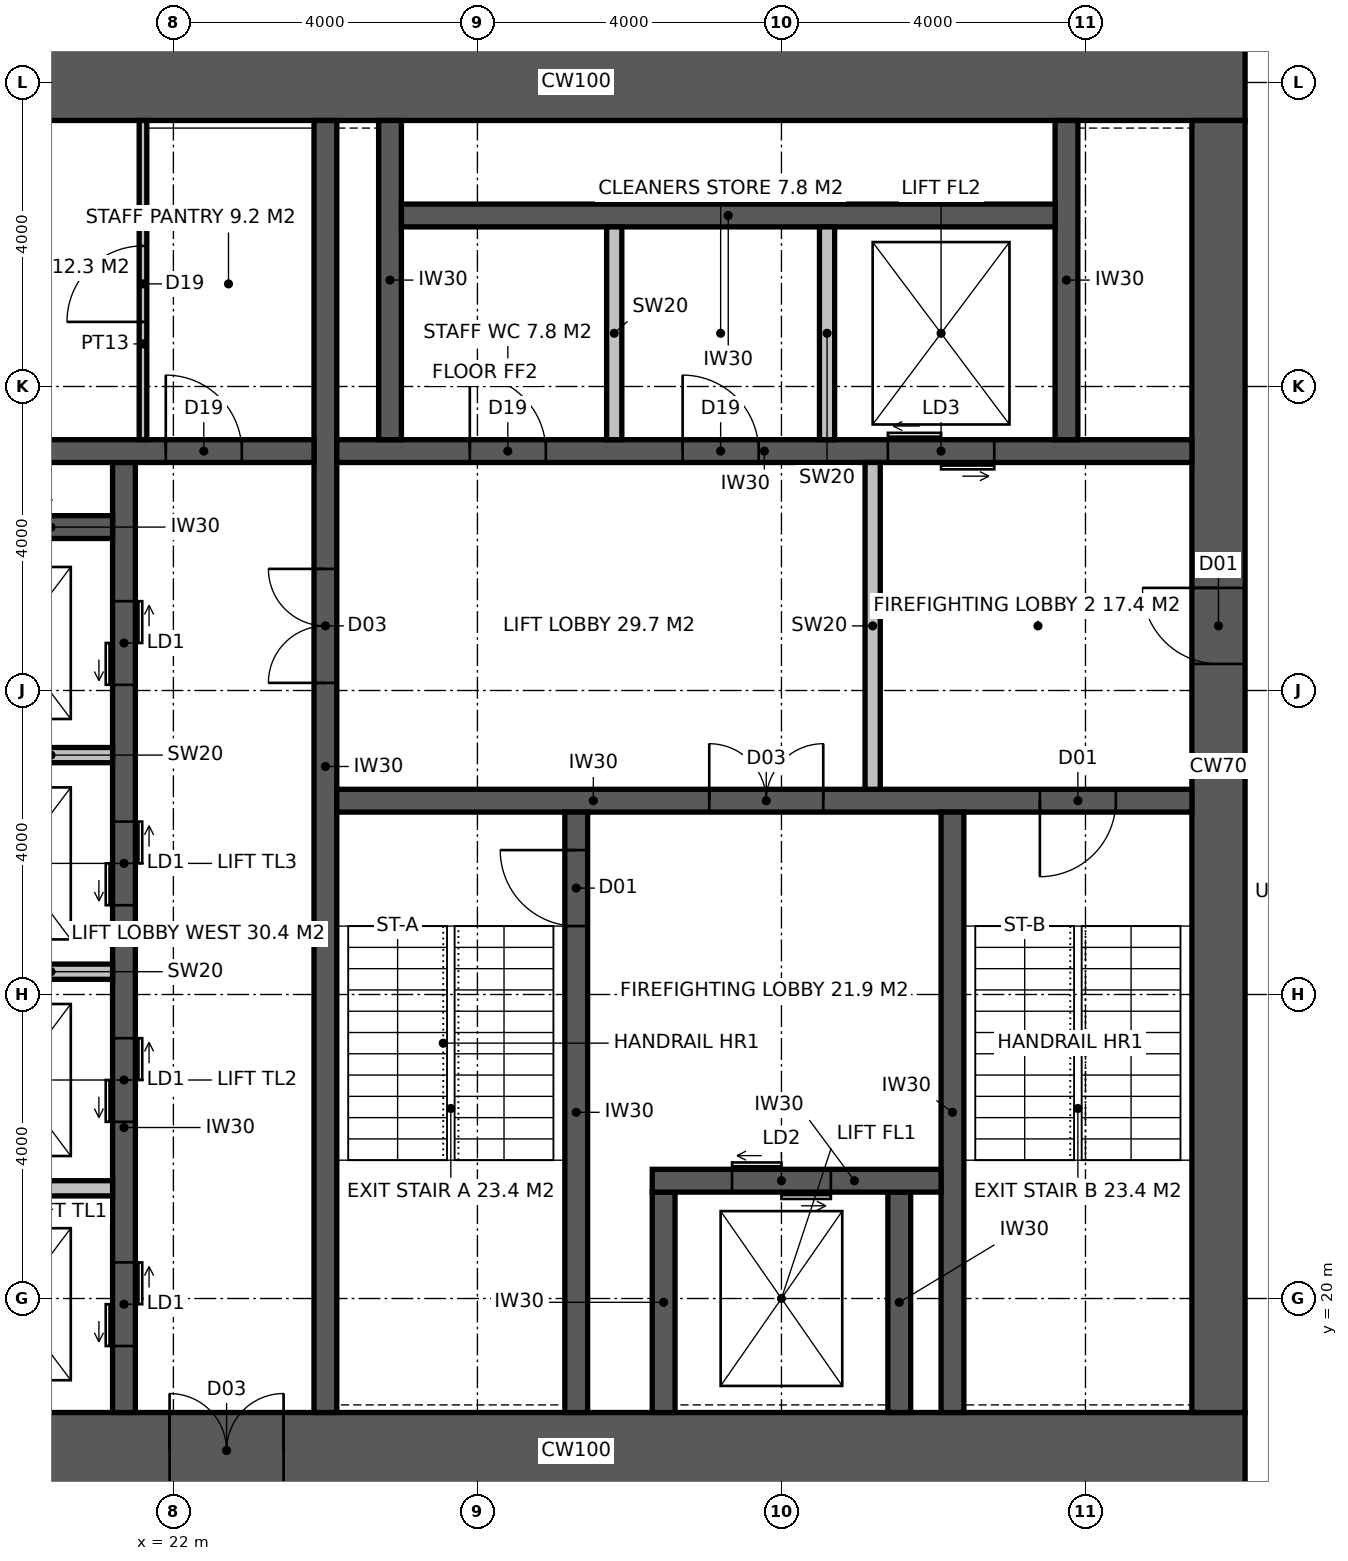
"""IFC4 building model, lengths in metres.
Left out: names, types, materials, properties, quantities, classifications, styles, units other than length and angle.
Written with IfcOpenShell. Run it as: python <this file> out.ifc"""

import sys

from ifc_helpers import new_model, si_unit, direction, frame, frame_2d, origin, place, context, subcontext, project, spatial, rectangle, extrude, element, fill, save


model = new_model("IFC4")
c1 = context("Model", 3, precision=1e-05, world=origin(), true_north=direction((0.0, 1.0)))
c2 = subcontext(c1, "Body", "Model", "MODEL_VIEW")
j1 = project(units=[si_unit("LENGTHUNIT", "METRE"), si_unit("PLANEANGLEUNIT", "RADIAN")], contexts=[c1])
p1 = place(None, origin())
s1 = spatial("IfcSite", under=j1, at=p1, CompositionType="ELEMENT")
p2 = place(p1, origin())
s2 = spatial("IfcBuilding", under=s1, at=p2, CompositionType="ELEMENT")
p3 = place(p2, frame((0.0, 0.0, 242.2)))
s3 = spatial("IfcBuildingStorey", under=s2, at=p3, CompositionType="ELEMENT", Elevation=242.2)
p4 = place(p3, frame((18.5, 18.0, -0.15), z_axis=(0.0, 0.0, 1.0), x_axis=(1.0, 0.0, 0.0)))
e1 = element("IfcWall", 1, at=p4, inside=s3, PredefinedType="SHEAR", context=c2, shape_type="SweptSolid", body=[
    extrude(rectangle(XDim=17.6, YDim=1.0, at=frame_2d((8.8, 0.0))), origin(), (0.0, 0.0, 1.0), 4.0),
])
p5 = place(p4, frame((3.45, 0.0, 0.15)))
e2 = element("IfcOpeningElement", 2, at=p5, cuts=e1, PredefinedType="OPENING", context=c2, shape_type="SweptSolid", body=[
    extrude(rectangle(XDim=1.5, YDim=2.4, at=frame_2d((0.75, 1.2))), frame((0.0, 0.51, 0.0), z_axis=(0.0, -1.0, 0.0), x_axis=(1.0, 0.0, 0.0)), (0.0, 0.0, 1.0), 1.02),
])
p6 = place(p3, frame((18.5, 36.0, -0.15), z_axis=(0.0, 0.0, 1.0), x_axis=(1.0, 0.0, 0.0)))
e3 = element("IfcWall", 3, at=p6, inside=s3, PredefinedType="SHEAR", context=c2, shape_type="SweptSolid", body=[
    extrude(rectangle(XDim=17.6, YDim=1.0, at=frame_2d((8.8, 0.0))), origin(), (0.0, 0.0, 1.0), 4.0),
])
p7 = place(p3, frame((35.75, 18.5, -0.15), z_axis=(0.0, 0.0, 1.0), x_axis=(0.0, 1.0, 0.0)))
e4 = element("IfcWall", 4, at=p7, inside=s3, PredefinedType="SHEAR", context=c2, shape_type="SweptSolid", body=[
    extrude(rectangle(XDim=17.0, YDim=0.7, at=frame_2d((8.5, 0.0))), origin(), (0.0, 0.0, 1.0), 4.0),
])
p8 = place(p7, frame((9.85, 0.0, 0.15)))
e5 = element("IfcOpeningElement", 5, at=p8, cuts=e4, PredefinedType="OPENING", context=c2, shape_type="SweptSolid", body=[
    extrude(rectangle(XDim=1.0, YDim=2.2, at=frame_2d((0.5, 1.1))), frame((0.0, 0.36, 0.0), z_axis=(0.0, -1.0, 0.0), x_axis=(1.0, 0.0, 0.0)), (0.0, 0.0, 1.0), 0.72),
])
p9 = place(p3, frame((24.0, 18.5, -0.15), z_axis=(0.0, 0.0, 1.0), x_axis=(0.0, 1.0, 0.0)))
e6 = element("IfcWall", 6, at=p9, inside=s3, PredefinedType="SHEAR", context=c2, shape_type="SweptSolid", body=[
    extrude(rectangle(XDim=17.0, YDim=0.3, at=frame_2d((8.5, 0.0))), origin(), (0.0, 0.0, 1.0), 4.0),
])
p10 = place(p9, frame((9.6, 0.0, 0.15)))
e7 = element("IfcOpeningElement", 7, at=p10, cuts=e6, PredefinedType="OPENING", context=c2, shape_type="SweptSolid", body=[
    extrude(rectangle(XDim=1.5, YDim=2.4, at=frame_2d((0.75, 1.2))), frame((0.0, 0.16, 0.0), z_axis=(0.0, -1.0, 0.0), x_axis=(1.0, 0.0, 0.0)), (0.0, 0.0, 1.0), 0.32),
])
p11 = place(p3, frame((24.15, 26.55, -0.15), z_axis=(0.0, 0.0, 1.0), x_axis=(1.0, 0.0, 0.0)))
e8 = element("IfcWall", 8, at=p11, inside=s3, PredefinedType="SHEAR", context=c2, shape_type="SweptSolid", body=[
    extrude(rectangle(XDim=11.25, YDim=0.3, at=frame_2d((5.625, 0.0))), origin(), (0.0, 0.0, 1.0), 4.0),
])
p12 = place(p11, frame((9.25, 0.0, 0.15)))
e9 = element("IfcOpeningElement", 9, at=p12, cuts=e8, PredefinedType="OPENING", context=c2, shape_type="SweptSolid", body=[
    extrude(rectangle(XDim=1.0, YDim=2.2, at=frame_2d((0.5, 1.1))), frame((0.0, 0.16, 0.0), z_axis=(0.0, -1.0, 0.0), x_axis=(1.0, 0.0, 0.0)), (0.0, 0.0, 1.0), 0.32),
])
p13 = place(p11, frame((4.9, 0.0, 0.15)))
e10 = element("IfcOpeningElement", 10, at=p13, cuts=e8, PredefinedType="OPENING", context=c2, shape_type="SweptSolid", body=[
    extrude(rectangle(XDim=1.5, YDim=2.4, at=frame_2d((0.75, 1.2))), frame((0.0, 0.16, 0.0), z_axis=(0.0, -1.0, 0.0), x_axis=(1.0, 0.0, 0.0)), (0.0, 0.0, 1.0), 0.32),
])
p14 = place(p3, frame((27.3, 18.5, -0.15), z_axis=(0.0, 0.0, 1.0), x_axis=(0.0, 1.0, 0.0)))
e11 = element("IfcWall", 11, at=p14, inside=s3, PredefinedType="SHEAR", context=c2, shape_type="SweptSolid", body=[
    extrude(rectangle(XDim=7.9, YDim=0.3, at=frame_2d((3.95, 0.0))), origin(), (0.0, 0.0, 1.0), 4.0),
])
p15 = place(p14, frame((6.4, 0.0, 0.15)))
e12 = element("IfcOpeningElement", 12, at=p15, cuts=e11, PredefinedType="OPENING", context=c2, shape_type="SweptSolid", body=[
    extrude(rectangle(XDim=1.0, YDim=2.2, at=frame_2d((0.5, 1.1))), frame((0.0, 0.16, 0.0), z_axis=(0.0, -1.0, 0.0), x_axis=(1.0, 0.0, 0.0)), (0.0, 0.0, 1.0), 0.32),
])
p16 = place(p3, frame((32.25, 18.5, -0.15), z_axis=(0.0, 0.0, 1.0), x_axis=(0.0, 1.0, 0.0)))
e13 = element("IfcWall", 13, at=p16, inside=s3, PredefinedType="SHEAR", context=c2, shape_type="SweptSolid", body=[
    extrude(rectangle(XDim=7.9, YDim=0.3, at=frame_2d((3.95, 0.0))), origin(), (0.0, 0.0, 1.0), 4.0),
])
for number, where, z_axis, x_axis in (
    (14, (28.45, 18.5, -0.15), (0.0, 0.0, 1.0), (0.0, 1.0, 0.0)),
    (15, (31.55, 18.5, -0.15), (0.0, 0.0, 1.0), (0.0, 1.0, 0.0)),
):
    element("IfcWall", number, at=place(p3, frame(where, z_axis=z_axis, x_axis=x_axis)), inside=s3, PredefinedType="SHEAR", context=c2, shape_type="SweptSolid", body=[
        extrude(rectangle(XDim=2.9, YDim=0.3, at=frame_2d((1.45, 0.0))), origin(), (0.0, 0.0, 1.0), 4.0),
    ])
p17 = place(p3, frame((28.3, 21.55, -0.15), z_axis=(0.0, 0.0, 1.0), x_axis=(1.0, 0.0, 0.0)))
e16 = element("IfcWall", 16, at=p17, inside=s3, PredefinedType="SHEAR", context=c2, shape_type="SweptSolid", body=[
    extrude(rectangle(XDim=3.8, YDim=0.3, at=frame_2d((1.9, 0.0))), origin(), (0.0, 0.0, 1.0), 4.0),
])
p18 = place(p17, frame((1.05, 0.0, 0.15)))
e17 = element("IfcOpeningElement", 17, at=p18, cuts=e16, PredefinedType="OPENING", context=c2, shape_type="SweptSolid", body=[
    extrude(rectangle(XDim=1.3, YDim=2.4, at=frame_2d((0.65, 1.2))), frame((0.0, 0.16, 0.0), z_axis=(0.0, -1.0, 0.0), x_axis=(1.0, 0.0, 0.0)), (0.0, 0.0, 1.0), 0.32),
])
p19 = place(p3, frame((24.15, 31.15, -0.15), z_axis=(0.0, 0.0, 1.0), x_axis=(1.0, 0.0, 0.0)))
e18 = element("IfcWall", 18, at=p19, inside=s3, PredefinedType="SHEAR", context=c2, shape_type="SweptSolid", body=[
    extrude(rectangle(XDim=11.25, YDim=0.3, at=frame_2d((5.625, 0.0))), origin(), (0.0, 0.0, 1.0), 4.0),
])
p20 = place(p19, frame((1.75, 0.0, 0.15)))
e19 = element("IfcOpeningElement", 19, at=p20, cuts=e18, PredefinedType="OPENING", context=c2, shape_type="SweptSolid", body=[
    extrude(rectangle(XDim=1.0, YDim=2.2, at=frame_2d((0.5, 1.1))), frame((0.0, 0.16, 0.0), z_axis=(0.0, -1.0, 0.0), x_axis=(1.0, 0.0, 0.0)), (0.0, 0.0, 1.0), 0.32),
])
p21 = place(p19, frame((4.55, 0.0, 0.15)))
e20 = element("IfcOpeningElement", 20, at=p21, cuts=e18, PredefinedType="OPENING", context=c2, shape_type="SweptSolid", body=[
    extrude(rectangle(XDim=1.0, YDim=2.2, at=frame_2d((0.5, 1.1))), frame((0.0, 0.16, 0.0), z_axis=(0.0, -1.0, 0.0), x_axis=(1.0, 0.0, 0.0)), (0.0, 0.0, 1.0), 0.32),
])
p22 = place(p19, frame((7.25, 0.0, 0.15)))
e21 = element("IfcOpeningElement", 21, at=p22, cuts=e18, PredefinedType="OPENING", context=c2, shape_type="SweptSolid", body=[
    extrude(rectangle(XDim=1.4, YDim=2.4, at=frame_2d((0.7, 1.2))), frame((0.0, 0.16, 0.0), z_axis=(0.0, -1.0, 0.0), x_axis=(1.0, 0.0, 0.0)), (0.0, 0.0, 1.0), 0.32),
])
p23 = place(p3, frame((21.35, 18.5, -0.15), z_axis=(0.0, 0.0, 1.0), x_axis=(0.0, 1.0, 0.0)))
e22 = element("IfcWall", 22, at=p23, inside=s3, PredefinedType="SHEAR", context=c2, shape_type="SweptSolid", body=[
    extrude(rectangle(XDim=12.5, YDim=0.3, at=frame_2d((6.25, 0.0))), origin(), (0.0, 0.0, 1.0), 4.0),
])
p24 = place(p23, frame((0.875, 0.0, 0.15)))
e23 = element("IfcOpeningElement", 23, at=p24, cuts=e22, PredefinedType="OPENING", context=c2, shape_type="SweptSolid", body=[
    extrude(rectangle(XDim=1.1, YDim=2.2, at=frame_2d((0.55, 1.1))), frame((0.0, 0.16, 0.0), z_axis=(0.0, -1.0, 0.0), x_axis=(1.0, 0.0, 0.0)), (0.0, 0.0, 1.0), 0.32),
])
p25 = place(p23, frame((3.825, 0.0, 0.15)))
e24 = element("IfcOpeningElement", 24, at=p25, cuts=e22, PredefinedType="OPENING", context=c2, shape_type="SweptSolid", body=[
    extrude(rectangle(XDim=1.1, YDim=2.2, at=frame_2d((0.55, 1.1))), frame((0.0, 0.16, 0.0), z_axis=(0.0, -1.0, 0.0), x_axis=(1.0, 0.0, 0.0)), (0.0, 0.0, 1.0), 0.32),
])
p26 = place(p23, frame((6.675, 0.0, 0.15)))
e25 = element("IfcOpeningElement", 25, at=p26, cuts=e22, PredefinedType="OPENING", context=c2, shape_type="SweptSolid", body=[
    extrude(rectangle(XDim=1.1, YDim=2.2, at=frame_2d((0.55, 1.1))), frame((0.0, 0.16, 0.0), z_axis=(0.0, -1.0, 0.0), x_axis=(1.0, 0.0, 0.0)), (0.0, 0.0, 1.0), 0.32),
])
p27 = place(p23, frame((9.575, 0.0, 0.15)))
e26 = element("IfcOpeningElement", 26, at=p27, cuts=e22, PredefinedType="OPENING", context=c2, shape_type="SweptSolid", body=[
    extrude(rectangle(XDim=1.1, YDim=2.2, at=frame_2d((0.55, 1.1))), frame((0.0, 0.16, 0.0), z_axis=(0.0, -1.0, 0.0), x_axis=(1.0, 0.0, 0.0)), (0.0, 0.0, 1.0), 0.32),
])
p28 = place(p3, frame((18.5, 31.15, -0.15), z_axis=(0.0, 0.0, 1.0), x_axis=(1.0, 0.0, 0.0)))
e27 = element("IfcWall", 27, at=p28, inside=s3, PredefinedType="SHEAR", context=c2, shape_type="SweptSolid", body=[
    extrude(rectangle(XDim=5.35, YDim=0.3, at=frame_2d((2.675, 0.0))), origin(), (0.0, 0.0, 1.0), 4.0),
])
p29 = place(p28, frame((3.4, 0.0, 0.15)))
e28 = element("IfcOpeningElement", 28, at=p29, cuts=e27, PredefinedType="OPENING", context=c2, shape_type="SweptSolid", body=[
    extrude(rectangle(XDim=1.0, YDim=2.2, at=frame_2d((0.5, 1.1))), frame((0.0, 0.16, 0.0), z_axis=(0.0, -1.0, 0.0), x_axis=(1.0, 0.0, 0.0)), (0.0, 0.0, 1.0), 0.32),
])
p30 = place(p3, frame((18.5, 30.15, -0.15), z_axis=(0.0, 0.0, 1.0), x_axis=(1.0, 0.0, 0.0)))
e29 = element("IfcWall", 29, at=p30, inside=s3, PredefinedType="SHEAR", context=c2, shape_type="SweptSolid", body=[
    extrude(rectangle(XDim=2.7, YDim=0.3, at=frame_2d((1.35, 0.0))), origin(), (0.0, 0.0, 1.0), 4.0),
])
for number, where, z_axis, x_axis in (
    (30, (24.85, 31.3, -0.15), (0.0, 0.0, 1.0), (0.0, 1.0, 0.0)),
    (31, (33.75, 31.3, -0.15), (0.0, 0.0, 1.0), (0.0, 1.0, 0.0)),
):
    element("IfcWall", number, at=place(p3, frame(where, z_axis=z_axis, x_axis=x_axis)), inside=s3, PredefinedType="SHEAR", context=c2, shape_type="SweptSolid", body=[
        extrude(rectangle(XDim=4.2, YDim=0.3, at=frame_2d((2.1, 0.0))), origin(), (0.0, 0.0, 1.0), 4.0),
    ])
p31 = place(p3, frame((25.0, 34.25, -0.15), z_axis=(0.0, 0.0, 1.0), x_axis=(1.0, 0.0, 0.0)))
e32 = element("IfcWall", 32, at=p31, inside=s3, PredefinedType="SHEAR", context=c2, shape_type="SweptSolid", body=[
    extrude(rectangle(XDim=8.6, YDim=0.3, at=frame_2d((4.3, 0.0))), origin(), (0.0, 0.0, 1.0), 4.0),
])
p32 = place(p3, frame((27.8, 31.3, 0.0), z_axis=(0.0, 0.0, 1.0), x_axis=(0.0, 1.0, 0.0)))
e33 = element("IfcWall", 33, at=p32, inside=s3, PredefinedType="SOLIDWALL", context=c2, shape_type="SweptSolid", body=[
    extrude(rectangle(XDim=2.8, YDim=0.2, at=frame_2d((1.4, 0.0))), origin(), (0.0, 0.0, 1.0), 3.85),
])
p33 = place(p3, frame((30.6, 31.3, -0.15), z_axis=(0.0, 0.0, 1.0), x_axis=(0.0, 1.0, 0.0)))
e34 = element("IfcWall", 34, at=p33, inside=s3, PredefinedType="SOLIDWALL", context=c2, shape_type="SweptSolid", body=[
    extrude(rectangle(XDim=2.8, YDim=0.2, at=frame_2d((1.4, 0.0))), origin(), (0.0, 0.0, 1.0), 4.0),
])
for number, where, z_axis, x_axis in (
    (35, (18.5, 21.45, -0.15), (0.0, 0.0, 1.0), (1.0, 0.0, 0.0)),
    (36, (18.5, 24.3, -0.15), (0.0, 0.0, 1.0), (1.0, 0.0, 0.0)),
    (37, (18.5, 27.15, -0.15), (0.0, 0.0, 1.0), (1.0, 0.0, 0.0)),
):
    element("IfcWall", number, at=place(p3, frame(where, z_axis=z_axis, x_axis=x_axis)), inside=s3, PredefinedType="SOLIDWALL", context=c2, shape_type="SweptSolid", body=[
        extrude(rectangle(XDim=2.7, YDim=0.2, at=frame_2d((1.35, 0.0))), origin(), (0.0, 0.0, 1.0), 4.0),
    ])
p34 = place(p3, frame((31.2, 26.7, 0.0), z_axis=(0.0, 0.0, 1.0), x_axis=(0.0, 1.0, 0.0)))
e38 = element("IfcWall", 38, at=p34, inside=s3, PredefinedType="SOLIDWALL", context=c2, shape_type="SweptSolid", body=[
    extrude(rectangle(XDim=4.3, YDim=0.2, at=frame_2d((2.15, 0.0))), origin(), (0.0, 0.0, 1.0), 3.85),
])
p35 = place(p3, frame((21.6, 31.3, 0.0), z_axis=(0.0, 0.0, 1.0), x_axis=(0.0, 1.0, 0.0)))
e39 = element("IfcWall", 39, at=p35, inside=s3, PredefinedType="PARTITIONING", context=c2, shape_type="SweptSolid", body=[
    extrude(rectangle(XDim=4.2, YDim=0.1, at=frame_2d((2.1, 0.0))), origin(), (0.0, 0.0, 1.0), 3.85),
])
p36 = place(p35, frame((1.55, 0.0, 0.0)))
e40 = element("IfcOpeningElement", 40, at=p36, cuts=e39, PredefinedType="OPENING", context=c2, shape_type="SweptSolid", body=[
    extrude(rectangle(XDim=1.0, YDim=2.2, at=frame_2d((0.5, 1.1))), frame((0.0, 0.06, 0.0), z_axis=(0.0, -1.0, 0.0), x_axis=(1.0, 0.0, 0.0)), (0.0, 0.0, 1.0), 0.12),
])
p37 = place(p15, origin())
e41 = element("IfcDoor", 41, at=p37, inside=s3, OperationType="SINGLE_SWING_RIGHT", PredefinedType="DOOR", context=c2, shape_type="SweptSolid", body=[
    extrude(rectangle(XDim=1.0, YDim=2.2, at=frame_2d((0.5, 1.1))), frame((0.0, 0.025, 0.0), z_axis=(0.0, -1.0, 0.0), x_axis=(1.0, 0.0, 0.0)), (0.0, 0.0, 1.0), 0.05),
])
fill(e12, e41)
p38 = place(p12, frame((1.0, 0.0, 0.0), z_axis=(0.0, 0.0, 1.0), x_axis=(-1.0, 0.0, 0.0)))
e42 = element("IfcDoor", 42, at=p38, inside=s3, OperationType="SINGLE_SWING_RIGHT", PredefinedType="DOOR", context=c2, shape_type="SweptSolid", body=[
    extrude(rectangle(XDim=1.0, YDim=2.2, at=frame_2d((0.5, 1.1))), frame((0.0, 0.025, 0.0), z_axis=(0.0, -1.0, 0.0), x_axis=(1.0, 0.0, 0.0)), (0.0, 0.0, 1.0), 0.05),
])
fill(e9, e42)
p39 = place(p8, origin())
e43 = element("IfcDoor", 43, at=p39, inside=s3, OperationType="SINGLE_SWING_RIGHT", PredefinedType="DOOR", context=c2, shape_type="SweptSolid", body=[
    extrude(rectangle(XDim=1.0, YDim=2.2, at=frame_2d((0.5, 1.1))), frame((0.0, 0.025, 0.0), z_axis=(0.0, -1.0, 0.0), x_axis=(1.0, 0.0, 0.0)), (0.0, 0.0, 1.0), 0.05),
])
fill(e5, e43)
p40 = place(p13, origin())
e44 = element("IfcDoor", 44, at=p40, inside=s3, OperationType="DOUBLE_DOOR_DOUBLE_SWING", PredefinedType="DOOR", context=c2, shape_type="SweptSolid", body=[
    extrude(rectangle(XDim=1.5, YDim=2.4, at=frame_2d((0.75, 1.2))), frame((0.0, 0.025, 0.0), z_axis=(0.0, -1.0, 0.0), x_axis=(1.0, 0.0, 0.0)), (0.0, 0.0, 1.0), 0.05),
])
fill(e10, e44)
p41 = place(p10, origin())
e45 = element("IfcDoor", 45, at=p41, inside=s3, OperationType="DOUBLE_DOOR_DOUBLE_SWING", PredefinedType="DOOR", context=c2, shape_type="SweptSolid", body=[
    extrude(rectangle(XDim=1.5, YDim=2.4, at=frame_2d((0.75, 1.2))), frame((0.0, 0.025, 0.0), z_axis=(0.0, -1.0, 0.0), x_axis=(1.0, 0.0, 0.0)), (0.0, 0.0, 1.0), 0.05),
])
fill(e7, e45)
p42 = place(p29, origin())
e46 = element("IfcDoor", 46, at=p42, inside=s3, OperationType="SINGLE_SWING_LEFT", PredefinedType="DOOR", context=c2, shape_type="SweptSolid", body=[
    extrude(rectangle(XDim=1.0, YDim=2.2, at=frame_2d((0.5, 1.1))), frame((0.0, 0.025, 0.0), z_axis=(0.0, -1.0, 0.0), x_axis=(1.0, 0.0, 0.0)), (0.0, 0.0, 1.0), 0.05),
])
fill(e28, e46)
p43 = place(p36, origin())
e47 = element("IfcDoor", 47, at=p43, inside=s3, OperationType="SINGLE_SWING_LEFT", PredefinedType="DOOR", context=c2, shape_type="SweptSolid", body=[
    extrude(rectangle(XDim=1.0, YDim=2.2, at=frame_2d((0.5, 1.1))), frame((0.0, 0.025, 0.0), z_axis=(0.0, -1.0, 0.0), x_axis=(1.0, 0.0, 0.0)), (0.0, 0.0, 1.0), 0.05),
])
fill(e40, e47)
p44 = place(p20, origin())
e48 = element("IfcDoor", 48, at=p44, inside=s3, OperationType="SINGLE_SWING_LEFT", PredefinedType="DOOR", context=c2, shape_type="SweptSolid", body=[
    extrude(rectangle(XDim=1.0, YDim=2.2, at=frame_2d((0.5, 1.1))), frame((0.0, 0.025, 0.0), z_axis=(0.0, -1.0, 0.0), x_axis=(1.0, 0.0, 0.0)), (0.0, 0.0, 1.0), 0.05),
])
fill(e19, e48)
p45 = place(p21, origin())
e49 = element("IfcDoor", 49, at=p45, inside=s3, OperationType="SINGLE_SWING_LEFT", PredefinedType="DOOR", context=c2, shape_type="SweptSolid", body=[
    extrude(rectangle(XDim=1.0, YDim=2.2, at=frame_2d((0.5, 1.1))), frame((0.0, 0.025, 0.0), z_axis=(0.0, -1.0, 0.0), x_axis=(1.0, 0.0, 0.0)), (0.0, 0.0, 1.0), 0.05),
])
fill(e20, e49)
p46 = place(p5, origin())
e50 = element("IfcDoor", 50, at=p46, inside=s3, OperationType="DOUBLE_DOOR_DOUBLE_SWING", PredefinedType="DOOR", context=c2, shape_type="SweptSolid", body=[
    extrude(rectangle(XDim=1.5, YDim=2.4, at=frame_2d((0.75, 1.2))), frame((0.0, 0.025, 0.0), z_axis=(0.0, -1.0, 0.0), x_axis=(1.0, 0.0, 0.0)), (0.0, 0.0, 1.0), 0.05),
])
fill(e2, e50)
p47 = place(p18, origin())
e51 = element("IfcDoor", 51, at=p47, inside=s3, OperationType="DOUBLE_DOOR_SLIDING", PredefinedType="DOOR", context=c2, shape_type="SweptSolid", body=[
    extrude(rectangle(XDim=1.3, YDim=2.4, at=frame_2d((0.65, 1.2))), frame((0.0, 0.025, 0.0), z_axis=(0.0, -1.0, 0.0), x_axis=(1.0, 0.0, 0.0)), (0.0, 0.0, 1.0), 0.05),
])
fill(e17, e51)
p48 = place(p22, origin())
e52 = element("IfcDoor", 52, at=p48, inside=s3, OperationType="DOUBLE_DOOR_SLIDING", PredefinedType="DOOR", context=c2, shape_type="SweptSolid", body=[
    extrude(rectangle(XDim=1.4, YDim=2.4, at=frame_2d((0.7, 1.2))), frame((0.0, 0.025, 0.0), z_axis=(0.0, -1.0, 0.0), x_axis=(1.0, 0.0, 0.0)), (0.0, 0.0, 1.0), 0.05),
])
fill(e21, e52)
p49 = place(p24, origin())
e53 = element("IfcDoor", 53, at=p49, inside=s3, OperationType="DOUBLE_DOOR_SLIDING", PredefinedType="DOOR", context=c2, shape_type="SweptSolid", body=[
    extrude(rectangle(XDim=1.1, YDim=2.2, at=frame_2d((0.55, 1.1))), frame((0.0, 0.025, 0.0), z_axis=(0.0, -1.0, 0.0), x_axis=(1.0, 0.0, 0.0)), (0.0, 0.0, 1.0), 0.05),
])
fill(e23, e53)
p50 = place(p25, origin())
e54 = element("IfcDoor", 54, at=p50, inside=s3, OperationType="DOUBLE_DOOR_SLIDING", PredefinedType="DOOR", context=c2, shape_type="SweptSolid", body=[
    extrude(rectangle(XDim=1.1, YDim=2.2, at=frame_2d((0.55, 1.1))), frame((0.0, 0.025, 0.0), z_axis=(0.0, -1.0, 0.0), x_axis=(1.0, 0.0, 0.0)), (0.0, 0.0, 1.0), 0.05),
])
fill(e24, e54)
p51 = place(p26, origin())
e55 = element("IfcDoor", 55, at=p51, inside=s3, OperationType="DOUBLE_DOOR_SLIDING", PredefinedType="DOOR", context=c2, shape_type="SweptSolid", body=[
    extrude(rectangle(XDim=1.1, YDim=2.2, at=frame_2d((0.55, 1.1))), frame((0.0, 0.025, 0.0), z_axis=(0.0, -1.0, 0.0), x_axis=(1.0, 0.0, 0.0)), (0.0, 0.0, 1.0), 0.05),
])
fill(e25, e55)
p52 = place(p27, origin())
e56 = element("IfcDoor", 56, at=p52, inside=s3, OperationType="DOUBLE_DOOR_SLIDING", PredefinedType="DOOR", context=c2, shape_type="SweptSolid", body=[
    extrude(rectangle(XDim=1.1, YDim=2.2, at=frame_2d((0.55, 1.1))), frame((0.0, 0.025, 0.0), z_axis=(0.0, -1.0, 0.0), x_axis=(1.0, 0.0, 0.0)), (0.0, 0.0, 1.0), 0.05),
])
fill(e26, e56)
save(model, sys.argv[1])
